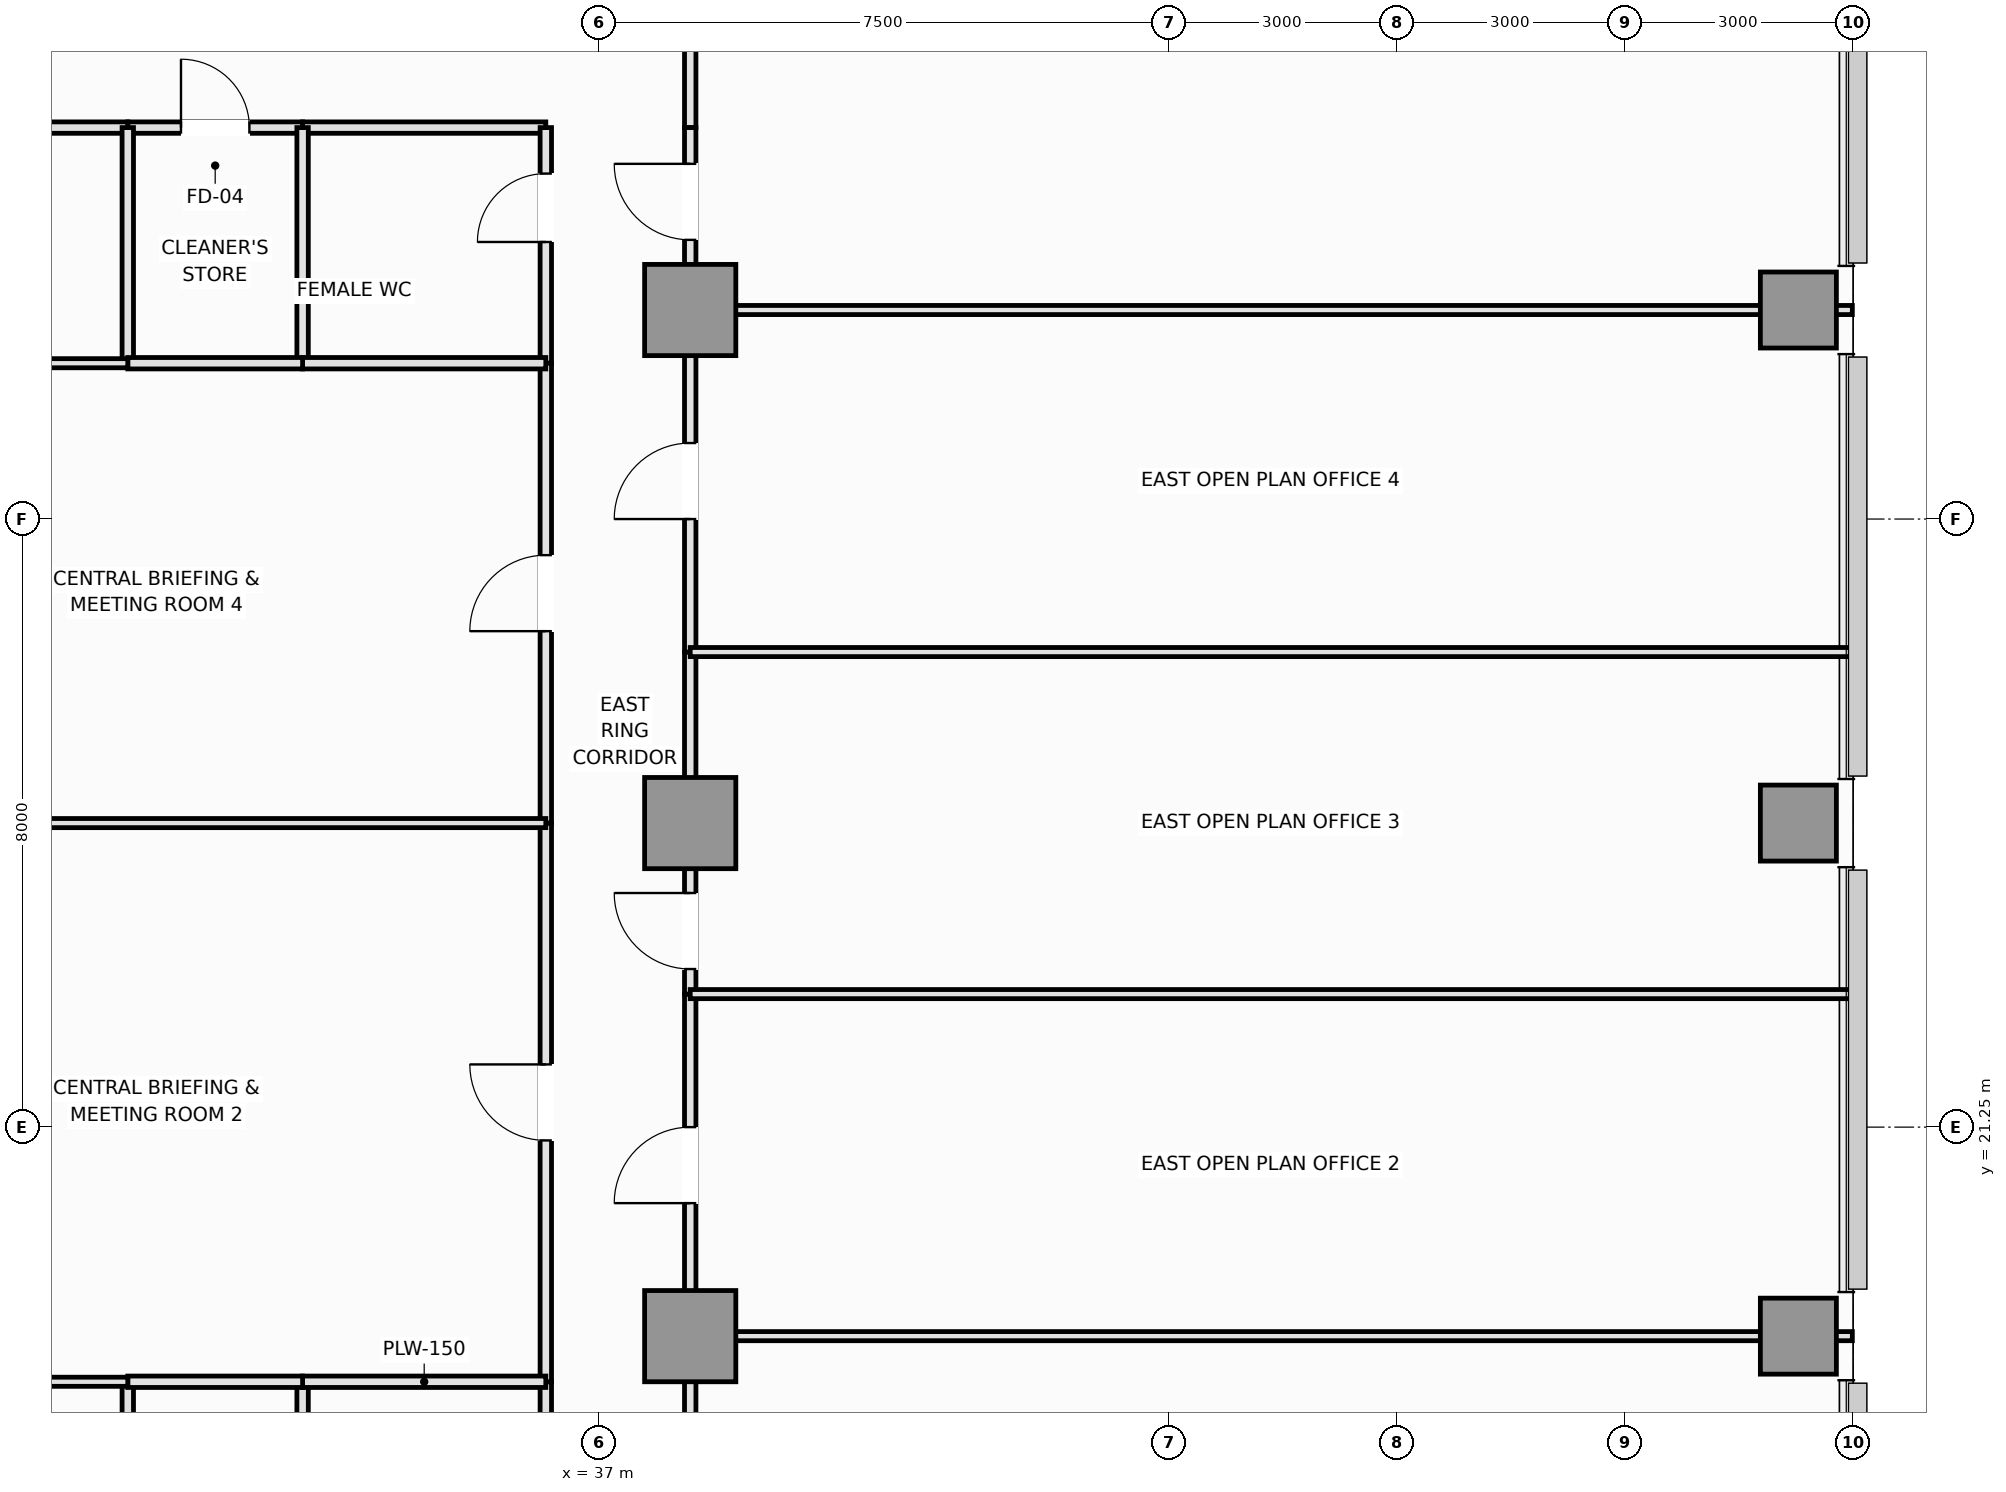
"""IFC4 building model, lengths in metres.
Left out: names, types, materials, properties, quantities, classifications, styles, units other than length and angle.
Written with IfcOpenShell. Run it as: python <this file> out.ifc"""

import sys

from ifc_helpers import new_model, si_unit, direction, frame, frame_2d, origin, origin_2d, place, context, subcontext, project, spatial, rectangle, extrude, element, fill, save


model = new_model("IFC4")
c1 = context("Model", 3, precision=1e-05, world=origin(), true_north=direction((0.0, 1.0)))
c2 = subcontext(c1, "Body", "Model", "MODEL_VIEW")
j1 = project(units=[si_unit("LENGTHUNIT", "METRE"), si_unit("PLANEANGLEUNIT", "RADIAN")], contexts=[c1])
p1 = place(None, origin())
s1 = spatial("IfcSite", under=j1, at=p1, CompositionType="ELEMENT")
p2 = place(p1, origin())
s2 = spatial("IfcBuilding", under=s1, at=p2, CompositionType="ELEMENT")
p3 = place(p2, frame((0.0, 0.0, 78.85)))
s3 = spatial("IfcBuildingStorey", under=s2, at=p3, CompositionType="ELEMENT", Elevation=78.85)
for number, where, z_axis, x_axis in (
    (1, (38.2, 18.5, 0.0), (0.0, 0.0, 1.0), (1.0, 0.0, 0.0)),
    (2, (38.2, 25.25, 0.0), (0.0, 0.0, 1.0), (1.0, 0.0, 0.0)),
    (3, (38.2, 32.0, 0.0), (0.0, 0.0, 1.0), (1.0, 0.0, 0.0)),
):
    element("IfcColumn", number, at=place(p3, frame(where, z_axis=z_axis, x_axis=x_axis)), inside=s3, PredefinedType="COLUMN", context=c2, shape_type="SweptSolid", body=[
        extrude(rectangle(XDim=1.2, YDim=1.2, at=origin_2d()), origin(), (0.0, 0.0, 1.0), 3.55),
    ])
for number, where, z_axis, x_axis in (
    (4, (52.78, 18.5, 0.0), (0.0, 0.0, 1.0), (1.0, 0.0, 0.0)),
    (5, (52.78, 25.25, 0.0), (0.0, 0.0, 1.0), (1.0, 0.0, 0.0)),
    (6, (52.78, 32.0, 0.0), (0.0, 0.0, 1.0), (1.0, 0.0, 0.0)),
):
    element("IfcColumn", number, at=place(p3, frame(where, z_axis=z_axis, x_axis=x_axis)), inside=s3, PredefinedType="COLUMN", context=c2, shape_type="SweptSolid", body=[
        extrude(rectangle(XDim=1.0, YDim=1.0, at=origin_2d()), origin(), (0.0, 0.0, 1.0), 3.55),
    ])
p4 = place(p3, frame((33.1, 34.4, 0.0), z_axis=(0.0, 0.0, 1.0), x_axis=(1.0, 0.0, 0.0)))
e7 = element("IfcWall", 7, at=p4, inside=s3, PredefinedType="PLUMBINGWALL", context=c2, shape_type="SweptSolid", body=[
    extrude(rectangle(XDim=3.2, YDim=0.15, at=frame_2d((1.6, 0.0))), origin(), (0.0, 0.0, 1.0), 3.37),
])
p5 = place(p3, frame((30.8, 34.4, 0.0), z_axis=(0.0, 0.0, 1.0), x_axis=(1.0, 0.0, 0.0)))
e8 = element("IfcWall", 8, at=p5, inside=s3, PredefinedType="PLUMBINGWALL", context=c2, shape_type="SweptSolid", body=[
    extrude(rectangle(XDim=2.3, YDim=0.15, at=frame_2d((1.15, 0.0))), origin(), (0.0, 0.0, 1.0), 3.37),
])
p6 = place(p5, frame((0.7, 0.0, 0.0)))
e9 = element("IfcOpeningElement", 9, at=p6, cuts=e8, PredefinedType="OPENING", context=c2, shape_type="SweptSolid", body=[
    extrude(rectangle(XDim=0.9, YDim=2.1, at=frame_2d((0.45, 1.05))), frame((0.0, 0.085, 0.0), z_axis=(0.0, -1.0, 0.0), x_axis=(1.0, 0.0, 0.0)), (0.0, 0.0, 1.0), 0.17),
])
p7 = place(p3, frame((24.45, 34.4, 0.0), z_axis=(0.0, 0.0, 1.0), x_axis=(1.0, 0.0, 0.0)))
e10 = element("IfcWall", 10, at=p7, inside=s3, PredefinedType="PARTITIONING", context=c2, shape_type="SweptSolid", body=[
    extrude(rectangle(XDim=6.35, YDim=0.15, at=frame_2d((3.175, 0.0))), origin(), (0.0, 0.0, 1.0), 3.37),
])
p8 = place(p3, frame((38.2, 34.4, 0.0), z_axis=(0.0, 0.0, 1.0), x_axis=(0.0, 1.0, 0.0)))
e11 = element("IfcWall", 11, at=p8, inside=s3, PredefinedType="PARTITIONING", context=c2, shape_type="SweptSolid", body=[
    extrude(rectangle(XDim=1.9, YDim=0.15, at=frame_2d((0.95, 0.0))), origin(), (0.0, 0.0, 1.0), 2.82),
])
p9 = place(p3, frame((36.3, 14.8, 0.0), z_axis=(0.0, 0.0, 1.0), x_axis=(0.0, 1.0, 0.0)))
e12 = element("IfcWall", 12, at=p9, inside=s3, PredefinedType="PLUMBINGWALL", context=c2, shape_type="SweptSolid", body=[
    extrude(rectangle(XDim=3.1, YDim=0.15, at=frame_2d((1.55, 0.0))), origin(), (0.0, 0.0, 1.0), 3.37),
])
p10 = place(p9, frame((1.1, 0.0, 0.0)))
e13 = element("IfcOpeningElement", 13, at=p10, cuts=e12, PredefinedType="OPENING", context=c2, shape_type="SweptSolid", body=[
    extrude(rectangle(XDim=0.9, YDim=2.1, at=frame_2d((0.45, 1.05))), frame((0.0, 0.085, 0.0), z_axis=(0.0, -1.0, 0.0), x_axis=(1.0, 0.0, 0.0)), (0.0, 0.0, 1.0), 0.17),
])
p11 = place(p3, frame((36.3, 31.3, 0.0), z_axis=(0.0, 0.0, 1.0), x_axis=(0.0, 1.0, 0.0)))
e14 = element("IfcWall", 14, at=p11, inside=s3, PredefinedType="PLUMBINGWALL", context=c2, shape_type="SweptSolid", body=[
    extrude(rectangle(XDim=3.1, YDim=0.15, at=frame_2d((1.55, 0.0))), origin(), (0.0, 0.0, 1.0), 3.37),
])
p12 = place(p11, frame((1.595, 0.0, 0.0)))
e15 = element("IfcOpeningElement", 15, at=p12, cuts=e14, PredefinedType="OPENING", context=c2, shape_type="SweptSolid", body=[
    extrude(rectangle(XDim=0.9, YDim=2.1, at=frame_2d((0.45, 1.05))), frame((0.0, 0.085, 0.0), z_axis=(0.0, -1.0, 0.0), x_axis=(1.0, 0.0, 0.0)), (0.0, 0.0, 1.0), 0.17),
])
p13 = place(p3, frame((36.3, 17.9, 0.0), z_axis=(0.0, 0.0, 1.0), x_axis=(0.0, 1.0, 0.0)))
e16 = element("IfcWall", 16, at=p13, inside=s3, PredefinedType="PARTITIONING", context=c2, shape_type="SweptSolid", body=[
    extrude(rectangle(XDim=7.35, YDim=0.15, at=frame_2d((3.675, 0.0))), origin(), (0.0, 0.0, 1.0), 3.37),
])
p14 = place(p13, frame((3.175, 0.0, 0.0)))
e17 = element("IfcOpeningElement", 17, at=p14, cuts=e16, PredefinedType="OPENING", context=c2, shape_type="SweptSolid", body=[
    extrude(rectangle(XDim=1.0, YDim=2.15, at=frame_2d((0.5, 1.075))), frame((0.0, 0.085, 0.0), z_axis=(0.0, -1.0, 0.0), x_axis=(1.0, 0.0, 0.0)), (0.0, 0.0, 1.0), 0.17),
])
p15 = place(p3, frame((36.3, 25.25, 0.0), z_axis=(0.0, 0.0, 1.0), x_axis=(0.0, 1.0, 0.0)))
e18 = element("IfcWall", 18, at=p15, inside=s3, PredefinedType="PARTITIONING", context=c2, shape_type="SweptSolid", body=[
    extrude(rectangle(XDim=6.05, YDim=0.15, at=frame_2d((3.025, 0.0))), origin(), (0.0, 0.0, 1.0), 3.37),
])
p16 = place(p15, frame((2.525, 0.0, 0.0)))
e19 = element("IfcOpeningElement", 19, at=p16, cuts=e18, PredefinedType="OPENING", context=c2, shape_type="SweptSolid", body=[
    extrude(rectangle(XDim=1.0, YDim=2.15, at=frame_2d((0.5, 1.075))), frame((0.0, 0.085, 0.0), z_axis=(0.0, -1.0, 0.0), x_axis=(1.0, 0.0, 0.0)), (0.0, 0.0, 1.0), 0.17),
])
p17 = place(p3, frame((38.2, 14.8, 0.0), z_axis=(0.0, 0.0, 1.0), x_axis=(0.0, 1.0, 0.0)))
e20 = element("IfcWall", 20, at=p17, inside=s3, PredefinedType="PARTITIONING", context=c2, shape_type="SweptSolid", body=[
    extrude(rectangle(XDim=3.7, YDim=0.15, at=frame_2d((1.85, 0.0))), origin(), (0.0, 0.0, 1.0), 2.82),
])
p18 = place(p17, frame((1.35, 0.0, 0.0)))
e21 = element("IfcOpeningElement", 21, at=p18, cuts=e20, PredefinedType="OPENING", context=c2, shape_type="SweptSolid", body=[
    extrude(rectangle(XDim=1.0, YDim=2.15, at=frame_2d((0.5, 1.075))), frame((0.0, 0.085, 0.0), z_axis=(0.0, -1.0, 0.0), x_axis=(1.0, 0.0, 0.0)), (0.0, 0.0, 1.0), 0.17),
])
p19 = place(p3, frame((38.2, 18.5, 0.0), z_axis=(0.0, 0.0, 1.0), x_axis=(0.0, 1.0, 0.0)))
e22 = element("IfcWall", 22, at=p19, inside=s3, PredefinedType="PARTITIONING", context=c2, shape_type="SweptSolid", body=[
    extrude(rectangle(XDim=4.5, YDim=0.15, at=frame_2d((2.25, 0.0))), origin(), (0.0, 0.0, 1.0), 2.82),
])
p20 = place(p19, frame((1.75, 0.0, 0.0)))
e23 = element("IfcOpeningElement", 23, at=p20, cuts=e22, PredefinedType="OPENING", context=c2, shape_type="SweptSolid", body=[
    extrude(rectangle(XDim=1.0, YDim=2.15, at=frame_2d((0.5, 1.075))), frame((0.0, 0.085, 0.0), z_axis=(0.0, -1.0, 0.0), x_axis=(1.0, 0.0, 0.0)), (0.0, 0.0, 1.0), 0.17),
])
p21 = place(p3, frame((38.2, 23.0, 0.0), z_axis=(0.0, 0.0, 1.0), x_axis=(0.0, 1.0, 0.0)))
e24 = element("IfcWall", 24, at=p21, inside=s3, PredefinedType="PARTITIONING", context=c2, shape_type="SweptSolid", body=[
    extrude(rectangle(XDim=4.5, YDim=0.15, at=frame_2d((2.25, 0.0))), origin(), (0.0, 0.0, 1.0), 2.82),
])
p22 = place(p21, frame((0.33, 0.0, 0.0)))
e25 = element("IfcOpeningElement", 25, at=p22, cuts=e24, PredefinedType="OPENING", context=c2, shape_type="SweptSolid", body=[
    extrude(rectangle(XDim=1.0, YDim=2.15, at=frame_2d((0.5, 1.075))), frame((0.0, 0.085, 0.0), z_axis=(0.0, -1.0, 0.0), x_axis=(1.0, 0.0, 0.0)), (0.0, 0.0, 1.0), 0.17),
])
p23 = place(p3, frame((38.2, 27.5, 0.0), z_axis=(0.0, 0.0, 1.0), x_axis=(0.0, 1.0, 0.0)))
e26 = element("IfcWall", 26, at=p23, inside=s3, PredefinedType="PARTITIONING", context=c2, shape_type="SweptSolid", body=[
    extrude(rectangle(XDim=4.5, YDim=0.15, at=frame_2d((2.25, 0.0))), origin(), (0.0, 0.0, 1.0), 2.82),
])
p24 = place(p23, frame((1.75, 0.0, 0.0)))
e27 = element("IfcOpeningElement", 27, at=p24, cuts=e26, PredefinedType="OPENING", context=c2, shape_type="SweptSolid", body=[
    extrude(rectangle(XDim=1.0, YDim=2.15, at=frame_2d((0.5, 1.075))), frame((0.0, 0.085, 0.0), z_axis=(0.0, -1.0, 0.0), x_axis=(1.0, 0.0, 0.0)), (0.0, 0.0, 1.0), 0.17),
])
p25 = place(p3, frame((38.2, 32.0, 0.0), z_axis=(0.0, 0.0, 1.0), x_axis=(0.0, 1.0, 0.0)))
e28 = element("IfcWall", 28, at=p25, inside=s3, PredefinedType="PARTITIONING", context=c2, shape_type="SweptSolid", body=[
    extrude(rectangle(XDim=2.4, YDim=0.15, at=frame_2d((1.2, 0.0))), origin(), (0.0, 0.0, 1.0), 2.82),
])
p26 = place(p25, frame((0.923, 0.0, 0.0)))
e29 = element("IfcOpeningElement", 29, at=p26, cuts=e28, PredefinedType="OPENING", context=c2, shape_type="SweptSolid", body=[
    extrude(rectangle(XDim=1.0, YDim=2.15, at=frame_2d((0.5, 1.075))), frame((0.0, 0.085, 0.0), z_axis=(0.0, -1.0, 0.0), x_axis=(1.0, 0.0, 0.0)), (0.0, 0.0, 1.0), 0.17),
])
p27 = place(p3, frame((33.1, 14.8, 0.0), z_axis=(0.0, 0.0, 1.0), x_axis=(0.0, 1.0, 0.0)))
e30 = element("IfcWall", 30, at=p27, inside=s3, PredefinedType="PLUMBINGWALL", context=c2, shape_type="SweptSolid", body=[
    extrude(rectangle(XDim=3.1, YDim=0.15, at=frame_2d((1.55, 0.0))), origin(), (0.0, 0.0, 1.0), 3.37),
])
p28 = place(p3, frame((33.1, 17.9, 0.0), z_axis=(0.0, 0.0, 1.0), x_axis=(1.0, 0.0, 0.0)))
e31 = element("IfcWall", 31, at=p28, inside=s3, PredefinedType="PLUMBINGWALL", context=c2, shape_type="SweptSolid", body=[
    extrude(rectangle(XDim=3.2, YDim=0.15, at=frame_2d((1.6, 0.0))), origin(), (0.0, 0.0, 1.0), 3.37),
])
p29 = place(p3, frame((33.1, 31.3, 0.0), z_axis=(0.0, 0.0, 1.0), x_axis=(0.0, 1.0, 0.0)))
e32 = element("IfcWall", 32, at=p29, inside=s3, PredefinedType="PLUMBINGWALL", context=c2, shape_type="SweptSolid", body=[
    extrude(rectangle(XDim=3.1, YDim=0.15, at=frame_2d((1.55, 0.0))), origin(), (0.0, 0.0, 1.0), 3.37),
])
p30 = place(p3, frame((33.1, 31.3, 0.0), z_axis=(0.0, 0.0, 1.0), x_axis=(1.0, 0.0, 0.0)))
e33 = element("IfcWall", 33, at=p30, inside=s3, PredefinedType="PLUMBINGWALL", context=c2, shape_type="SweptSolid", body=[
    extrude(rectangle(XDim=3.2, YDim=0.15, at=frame_2d((1.6, 0.0))), origin(), (0.0, 0.0, 1.0), 3.37),
])
p31 = place(p3, frame((30.8, 14.8, 0.0), z_axis=(0.0, 0.0, 1.0), x_axis=(0.0, 1.0, 0.0)))
e34 = element("IfcWall", 34, at=p31, inside=s3, PredefinedType="PLUMBINGWALL", context=c2, shape_type="SweptSolid", body=[
    extrude(rectangle(XDim=3.1, YDim=0.15, at=frame_2d((1.55, 0.0))), origin(), (0.0, 0.0, 1.0), 3.37),
])
p32 = place(p3, frame((30.8, 17.9, 0.0), z_axis=(0.0, 0.0, 1.0), x_axis=(1.0, 0.0, 0.0)))
e35 = element("IfcWall", 35, at=p32, inside=s3, PredefinedType="PLUMBINGWALL", context=c2, shape_type="SweptSolid", body=[
    extrude(rectangle(XDim=2.3, YDim=0.15, at=frame_2d((1.15, 0.0))), origin(), (0.0, 0.0, 1.0), 3.37),
])
p33 = place(p3, frame((30.8, 31.3, 0.0), z_axis=(0.0, 0.0, 1.0), x_axis=(0.0, 1.0, 0.0)))
e36 = element("IfcWall", 36, at=p33, inside=s3, PredefinedType="PLUMBINGWALL", context=c2, shape_type="SweptSolid", body=[
    extrude(rectangle(XDim=3.1, YDim=0.15, at=frame_2d((1.55, 0.0))), origin(), (0.0, 0.0, 1.0), 3.37),
])
p34 = place(p3, frame((30.8, 31.3, 0.0), z_axis=(0.0, 0.0, 1.0), x_axis=(1.0, 0.0, 0.0)))
e37 = element("IfcWall", 37, at=p34, inside=s3, PredefinedType="PLUMBINGWALL", context=c2, shape_type="SweptSolid", body=[
    extrude(rectangle(XDim=2.3, YDim=0.15, at=frame_2d((1.15, 0.0))), origin(), (0.0, 0.0, 1.0), 3.37),
])
for number, where, z_axis, x_axis in (
    (38, (27.5, 17.9, 0.0), (0.0, 0.0, 1.0), (1.0, 0.0, 0.0)),
    (39, (27.5, 31.3, 0.0), (0.0, 0.0, 1.0), (1.0, 0.0, 0.0)),
):
    element("IfcWall", number, at=place(p3, frame(where, z_axis=z_axis, x_axis=x_axis)), inside=s3, PredefinedType="PARTITIONING", context=c2, shape_type="SweptSolid", body=[
        extrude(rectangle(XDim=3.3, YDim=0.12, at=frame_2d((1.65, 0.0))), origin(), (0.0, 0.0, 1.0), 3.37),
    ])
p35 = place(p3, frame((27.5, 25.25, 0.0), z_axis=(0.0, 0.0, 1.0), x_axis=(1.0, 0.0, 0.0)))
e40 = element("IfcWall", 40, at=p35, inside=s3, PredefinedType="PARTITIONING", context=c2, shape_type="SweptSolid", body=[
    extrude(rectangle(XDim=8.8, YDim=0.12, at=frame_2d((4.4, 0.0))), origin(), (0.0, 0.0, 1.0), 2.72),
])
p36 = place(p3, frame((38.2, 18.5, 0.0), z_axis=(0.0, 0.0, 1.0), x_axis=(1.0, 0.0, 0.0)))
e41 = element("IfcWall", 41, at=p36, inside=s3, PredefinedType="PARTITIONING", context=c2, shape_type="SweptSolid", body=[
    extrude(rectangle(XDim=15.29, YDim=0.12, at=frame_2d((7.645, 0.0))), origin(), (0.0, 0.0, 1.0), 2.72),
])
for number, where, z_axis, x_axis in (
    (42, (38.2, 23.0, 0.0), (0.0, 0.0, 1.0), (1.0, 0.0, 0.0)),
    (43, (38.2, 27.5, 0.0), (0.0, 0.0, 1.0), (1.0, 0.0, 0.0)),
):
    element("IfcWall", number, at=place(p3, frame(where, z_axis=z_axis, x_axis=x_axis)), inside=s3, PredefinedType="PARTITIONING", context=c2, shape_type="SweptSolid", body=[
        extrude(rectangle(XDim=15.29, YDim=0.12, at=frame_2d((7.645, 0.0))), origin(), (0.0, 0.0, 1.0), 3.37),
    ])
p37 = place(p3, frame((38.2, 32.0, 0.0), z_axis=(0.0, 0.0, 1.0), x_axis=(1.0, 0.0, 0.0)))
e44 = element("IfcWall", 44, at=p37, inside=s3, PredefinedType="PARTITIONING", context=c2, shape_type="SweptSolid", body=[
    extrude(rectangle(XDim=15.29, YDim=0.12, at=frame_2d((7.645, 0.0))), origin(), (0.0, 0.0, 1.0), 2.72),
])
p38 = place(p6, origin())
e45 = element("IfcDoor", 45, at=p38, inside=s3, OperationType="SINGLE_SWING_LEFT", PredefinedType="DOOR", context=c2, shape_type="SweptSolid", body=[
    extrude(rectangle(XDim=0.9, YDim=2.1, at=frame_2d((0.45, 1.05))), frame((0.0, 0.025, 0.0), z_axis=(0.0, -1.0, 0.0), x_axis=(1.0, 0.0, 0.0)), (0.0, 0.0, 1.0), 0.05),
])
fill(e9, e45)
p39 = place(p12, origin())
e46 = element("IfcDoor", 46, at=p39, inside=s3, OperationType="SINGLE_SWING_LEFT", PredefinedType="DOOR", context=c2, shape_type="SweptSolid", body=[
    extrude(rectangle(XDim=0.9, YDim=2.1, at=frame_2d((0.45, 1.05))), frame((0.0, 0.025, 0.0), z_axis=(0.0, -1.0, 0.0), x_axis=(1.0, 0.0, 0.0)), (0.0, 0.0, 1.0), 0.05),
])
fill(e15, e46)
p40 = place(p14, origin())
e47 = element("IfcDoor", 47, at=p40, inside=s3, OperationType="SINGLE_SWING_RIGHT", PredefinedType="DOOR", context=c2, shape_type="SweptSolid", body=[
    extrude(rectangle(XDim=1.0, YDim=2.15, at=frame_2d((0.5, 1.075))), frame((0.0, 0.025, 0.0), z_axis=(0.0, -1.0, 0.0), x_axis=(1.0, 0.0, 0.0)), (0.0, 0.0, 1.0), 0.05),
])
fill(e17, e47)
p41 = place(p16, origin())
e48 = element("IfcDoor", 48, at=p41, inside=s3, OperationType="SINGLE_SWING_LEFT", PredefinedType="DOOR", context=c2, shape_type="SweptSolid", body=[
    extrude(rectangle(XDim=1.0, YDim=2.15, at=frame_2d((0.5, 1.075))), frame((0.0, 0.025, 0.0), z_axis=(0.0, -1.0, 0.0), x_axis=(1.0, 0.0, 0.0)), (0.0, 0.0, 1.0), 0.05),
])
fill(e19, e48)
p42 = place(p20, origin())
e49 = element("IfcDoor", 49, at=p42, inside=s3, OperationType="SINGLE_SWING_LEFT", PredefinedType="DOOR", context=c2, shape_type="SweptSolid", body=[
    extrude(rectangle(XDim=1.0, YDim=2.15, at=frame_2d((0.5, 1.075))), frame((0.0, 0.025, 0.0), z_axis=(0.0, -1.0, 0.0), x_axis=(1.0, 0.0, 0.0)), (0.0, 0.0, 1.0), 0.05),
])
fill(e23, e49)
p43 = place(p22, origin())
e50 = element("IfcDoor", 50, at=p43, inside=s3, OperationType="SINGLE_SWING_RIGHT", PredefinedType="DOOR", context=c2, shape_type="SweptSolid", body=[
    extrude(rectangle(XDim=1.0, YDim=2.15, at=frame_2d((0.5, 1.075))), frame((0.0, 0.025, 0.0), z_axis=(0.0, -1.0, 0.0), x_axis=(1.0, 0.0, 0.0)), (0.0, 0.0, 1.0), 0.05),
])
fill(e25, e50)
p44 = place(p24, origin())
e51 = element("IfcDoor", 51, at=p44, inside=s3, OperationType="SINGLE_SWING_LEFT", PredefinedType="DOOR", context=c2, shape_type="SweptSolid", body=[
    extrude(rectangle(XDim=1.0, YDim=2.15, at=frame_2d((0.5, 1.075))), frame((0.0, 0.025, 0.0), z_axis=(0.0, -1.0, 0.0), x_axis=(1.0, 0.0, 0.0)), (0.0, 0.0, 1.0), 0.05),
])
fill(e27, e51)
p45 = place(p26, origin())
e52 = element("IfcDoor", 52, at=p45, inside=s3, OperationType="SINGLE_SWING_RIGHT", PredefinedType="DOOR", context=c2, shape_type="SweptSolid", body=[
    extrude(rectangle(XDim=1.0, YDim=2.15, at=frame_2d((0.5, 1.075))), frame((0.0, 0.025, 0.0), z_axis=(0.0, -1.0, 0.0), x_axis=(1.0, 0.0, 0.0)), (0.0, 0.0, 1.0), 0.05),
])
fill(e29, e52)
save(model, sys.argv[1])
